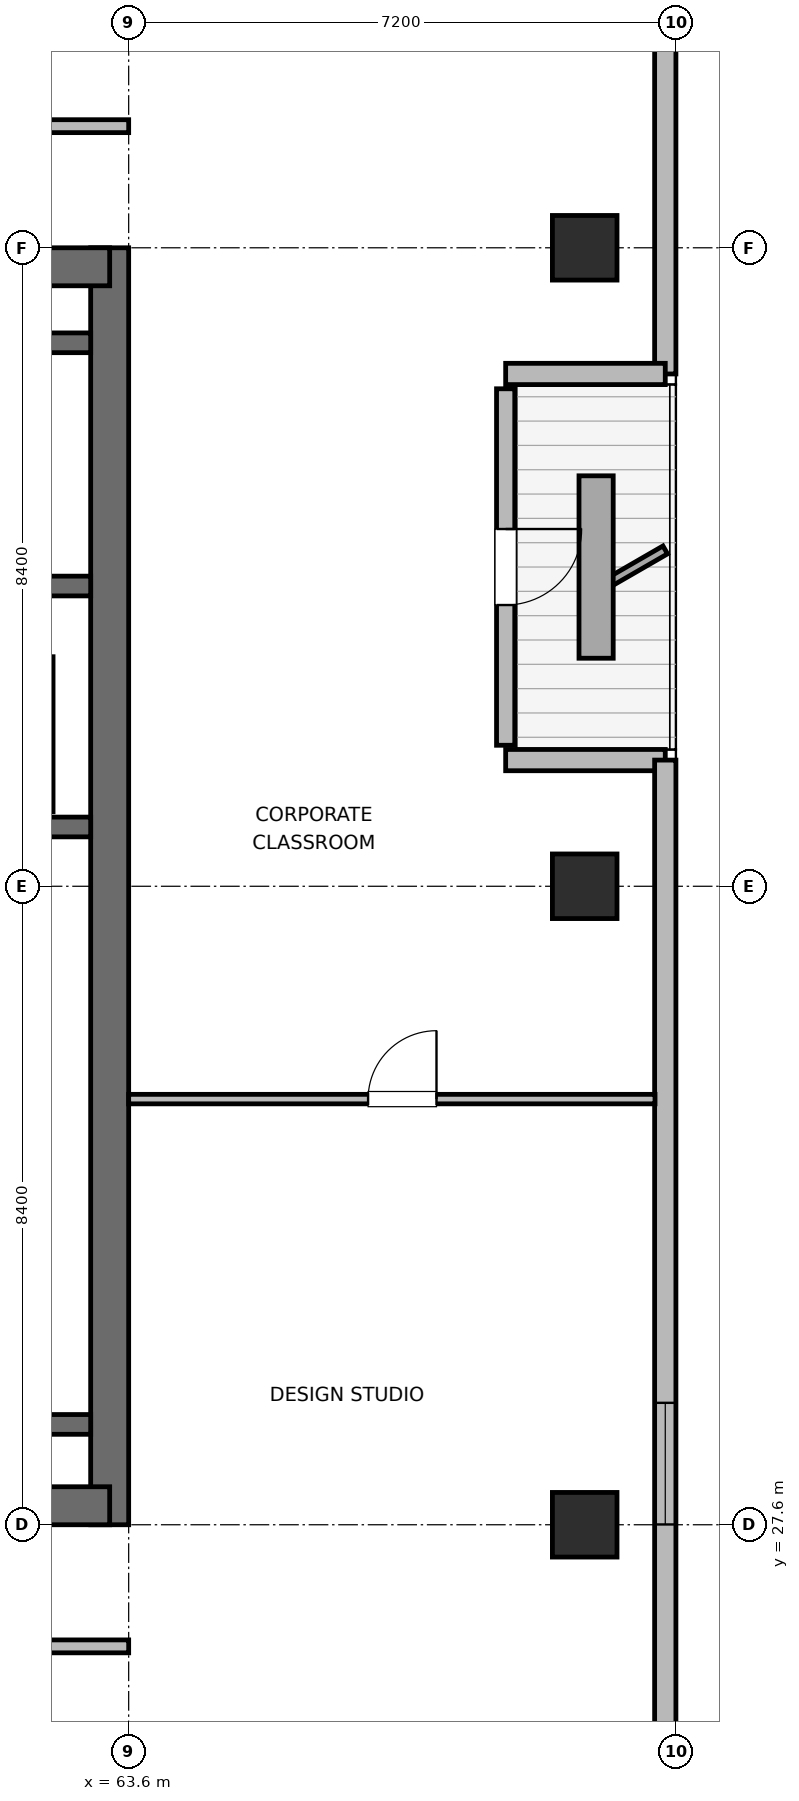
"""IFC4 building model, lengths in metres.
Left out: names, types, materials, properties, quantities, classifications, styles, units other than length and angle.
Written with IfcOpenShell. Run it as: python <this file> out.ifc"""

import sys

from ifc_helpers import new_model, si_unit, direction, frame, frame_2d, origin, origin_2d, place, context, subcontext, project, spatial, rectangle, extrude, element, fill, save


model = new_model("IFC4")
c1 = context("Model", 3, precision=1e-05, world=origin(), true_north=direction((0.0, 1.0)))
c2 = subcontext(c1, "Body", "Model", "MODEL_VIEW")
j1 = project(units=[si_unit("LENGTHUNIT", "METRE"), si_unit("PLANEANGLEUNIT", "RADIAN")], contexts=[c1])
p1 = place(None, origin())
s1 = spatial("IfcSite", under=j1, at=p1, CompositionType="ELEMENT")
p2 = place(p1, origin())
s2 = spatial("IfcBuilding", under=s1, at=p2, CompositionType="ELEMENT")
p3 = place(p2, frame((0.0, 0.0, 302.4)))
s3 = spatial("IfcBuildingStorey", under=s2, at=p3, CompositionType="ELEMENT", Elevation=302.4)
p4 = place(p3, frame((63.35, 27.6, 0.0), z_axis=(0.0, 0.0, 1.0), x_axis=(0.0, 1.0, 0.0)))
e1 = element("IfcWall", 1, at=p4, inside=s3, PredefinedType="SHEAR", context=c2, shape_type="SweptSolid", body=[
    extrude(rectangle(XDim=16.8, YDim=0.5, at=frame_2d((8.4, 0.0))), origin(), (0.0, 0.0, 1.0), 3.9),
])
p5 = place(p3, frame((53.85, 27.85, 0.0), z_axis=(0.0, 0.0, 1.0), x_axis=(1.0, 0.0, 0.0)))
e2 = element("IfcWall", 2, at=p5, inside=s3, PredefinedType="SHEAR", context=c2, shape_type="SweptSolid", body=[
    extrude(rectangle(XDim=9.5, YDim=0.5, at=frame_2d((4.75, 0.0))), origin(), (0.0, 0.0, 1.0), 3.9),
])
p6 = place(p5, frame((4.025, 0.0, 0.0)))
e3 = element("IfcOpeningElement", 3, at=p6, cuts=e2, PredefinedType="OPENING", context=c2, shape_type="SweptSolid", body=[
    extrude(rectangle(XDim=1.05, YDim=2.04, at=frame_2d((0.525, 1.02))), frame((0.0, 0.26, 0.0), z_axis=(0.0, -1.0, 0.0), x_axis=(1.0, 0.0, 0.0)), (0.0, 0.0, 1.0), 0.52),
])
p7 = place(p3, frame((53.85, 44.15, 0.0), z_axis=(0.0, 0.0, 1.0), x_axis=(1.0, 0.0, 0.0)))
e4 = element("IfcWall", 4, at=p7, inside=s3, PredefinedType="SHEAR", context=c2, shape_type="SweptSolid", body=[
    extrude(rectangle(XDim=9.5, YDim=0.5, at=frame_2d((4.75, 0.0))), origin(), (0.0, 0.0, 1.0), 3.9),
])
for number, where, z_axis, x_axis in (
    (5, (58.89, 28.92, 0.0), (0.0, 0.0, 1.0), (1.0, 0.0, 0.0)),
    (6, (58.89, 36.78, 0.0), (0.0, 0.0, 1.0), (1.0, 0.0, 0.0)),
):
    element("IfcWall", number, at=place(p3, frame(where, z_axis=z_axis, x_axis=x_axis)), inside=s3, PredefinedType="SHEAR", context=c2, shape_type="SweptSolid", body=[
        extrude(rectangle(XDim=4.21, YDim=0.26, at=frame_2d((2.105, 0.0))), origin(), (0.0, 0.0, 1.0), 3.9),
    ])
p8 = place(p3, frame((54.1, 39.95, 0.0), z_axis=(0.0, 0.0, 1.0), x_axis=(1.0, 0.0, 0.0)))
e7 = element("IfcWall", 7, at=p8, inside=s3, PredefinedType="SHEAR", context=c2, shape_type="SweptSolid", body=[
    extrude(rectangle(XDim=9.0, YDim=0.26, at=frame_2d((4.5, 0.0))), origin(), (0.0, 0.0, 1.0), 3.9),
])
p9 = place(p8, frame((1.1, 0.0, 0.0)))
e8 = element("IfcOpeningElement", 8, at=p9, cuts=e7, PredefinedType="OPENING", context=c2, shape_type="SweptSolid", body=[
    extrude(rectangle(XDim=1.0, YDim=2.04, at=frame_2d((0.5, 1.02))), frame((0.0, 0.14, 0.0), z_axis=(0.0, -1.0, 0.0), x_axis=(1.0, 0.0, 0.0)), (0.0, 0.0, 1.0), 0.28),
])
p10 = place(p3, frame((54.1, 43.15, 0.0), z_axis=(0.0, 0.0, 1.0), x_axis=(1.0, 0.0, 0.0)))
e9 = element("IfcWall", 9, at=p10, inside=s3, PredefinedType="SHEAR", context=c2, shape_type="SweptSolid", body=[
    extrude(rectangle(XDim=9.0, YDim=0.26, at=frame_2d((4.5, 0.0))), origin(), (0.0, 0.0, 1.0), 3.9),
])
for number, where, z_axis, x_axis in (
    (10, (69.6, 27.6, 0.0), (0.0, 0.0, 1.0), (1.0, 0.0, 0.0)),
    (11, (69.6, 36.0, 0.0), (0.0, 0.0, 1.0), (1.0, 0.0, 0.0)),
    (12, (69.6, 44.4, 0.0), (0.0, 0.0, 1.0), (1.0, 0.0, 0.0)),
):
    element("IfcColumn", number, at=place(p3, frame(where, z_axis=z_axis, x_axis=x_axis)), inside=s3, PredefinedType="COLUMN", context=c2, shape_type="SweptSolid", body=[
        extrude(rectangle(XDim=0.85, YDim=0.85, at=origin_2d()), origin(), (0.0, 0.0, 1.0), 3.9),
    ])
p11 = place(p3, frame((70.66, 48.582, 0.0), z_axis=(0.0, 0.0, 1.0), x_axis=(0.0, -1.0, 0.0)))
e13 = element("IfcWall", 13, at=p11, inside=s3, PredefinedType="SOLIDWALL", context=c2, shape_type="SweptSolid", body=[
    extrude(rectangle(XDim=5.842, YDim=0.28, at=frame_2d((2.921, 0.0))), origin(), (0.0, 0.0, 1.0), 3.68),
])
p12 = place(p3, frame((70.66, 42.74, 0.0), z_axis=(0.0, 0.0, 1.0), x_axis=(-1.0, 0.0, 0.0)))
e14 = element("IfcWall", 14, at=p12, inside=s3, PredefinedType="SOLIDWALL", context=c2, shape_type="SweptSolid", body=[
    extrude(rectangle(XDim=2.1, YDim=0.28, at=frame_2d((1.05, 0.0))), origin(), (0.0, 0.0, 1.0), 3.126),
])
p13 = place(p3, frame((68.56, 42.545, 0.0), z_axis=(0.0, 0.0, 1.0), x_axis=(0.0, -1.0, 0.0)))
e15 = element("IfcWall", 15, at=p13, inside=s3, PredefinedType="SOLIDWALL", context=c2, shape_type="SweptSolid", body=[
    extrude(rectangle(XDim=4.69, YDim=0.24, at=frame_2d((2.345, 0.0))), origin(), (0.0, 0.0, 1.0), 3.311),
])
p14 = place(p13, frame((1.845, 0.0, 0.0)))
e16 = element("IfcOpeningElement", 16, at=p14, cuts=e15, PredefinedType="OPENING", context=c2, shape_type="SweptSolid", body=[
    extrude(rectangle(XDim=1.0, YDim=2.02, at=frame_2d((0.5, 1.01))), frame((0.0, 0.13, 0.0), z_axis=(0.0, -1.0, 0.0), x_axis=(1.0, 0.0, 0.0)), (0.0, 0.0, 1.0), 0.26),
])
p15 = place(p3, frame((68.56, 37.66, 0.0), z_axis=(0.0, 0.0, 1.0), x_axis=(1.0, 0.0, 0.0)))
e17 = element("IfcWall", 17, at=p15, inside=s3, PredefinedType="SOLIDWALL", context=c2, shape_type="SweptSolid", body=[
    extrude(rectangle(XDim=2.1, YDim=0.28, at=frame_2d((1.05, 0.0))), origin(), (0.0, 0.0, 1.0), 3.126),
])
p16 = place(p3, frame((70.66, 37.66, 0.0), z_axis=(0.0, 0.0, 1.0), x_axis=(0.0, -1.0, 0.0)))
e18 = element("IfcWall", 18, at=p16, inside=s3, PredefinedType="SOLIDWALL", context=c2, shape_type="SweptSolid", body=[
    extrude(rectangle(XDim=14.241, YDim=0.28, at=frame_2d((7.121, 0.0))), origin(), (0.0, 0.0, 1.0), 3.68),
])
p17 = place(p16, frame((8.456, 0.0, 0.85)))
e19 = element("IfcOpeningElement", 19, at=p17, cuts=e18, PredefinedType="OPENING", context=c2, shape_type="SweptSolid", body=[
    extrude(rectangle(XDim=1.6, YDim=1.0, at=frame_2d((0.8, 0.5))), frame((0.0, 0.15, 0.0), z_axis=(0.0, -1.0, 0.0), x_axis=(1.0, 0.0, 0.0)), (0.0, 0.0, 1.0), 0.3),
])
p18 = place(p3, frame((62.5, 36.98, 0.0), z_axis=(0.0, 0.0, 1.0), x_axis=(0.0, 1.0, 0.0)))
e20 = element("IfcWall", 20, at=p18, inside=s3, PredefinedType="PARTITIONING", context=c2, shape_type="SweptSolid", body=[
    extrude(rectangle(XDim=2.04, YDim=0.21, at=frame_2d((1.02, 0.0))), origin(), (0.0, 0.0, 1.0), 3.68),
])
p19 = place(p3, frame((30.725, 26.0, 0.0), z_axis=(0.0, 0.0, 1.0), x_axis=(1.0, 0.0, 0.0)))
e21 = element("IfcWall", 21, at=p19, inside=s3, PredefinedType="PARTITIONING", context=c2, shape_type="SweptSolid", body=[
    extrude(rectangle(XDim=32.875, YDim=0.17, at=frame_2d((16.438, 0.0))), origin(), (0.0, 0.0, 1.0), 3.68),
])
p20 = place(p19, frame((1.362, 0.0, 0.0)))
e22 = element("IfcOpeningElement", 22, at=p20, cuts=e21, PredefinedType="OPENING", context=c2, shape_type="SweptSolid", body=[
    extrude(rectangle(XDim=0.95, YDim=2.04, at=frame_2d((0.475, 1.02))), frame((0.0, 0.095, 0.0), z_axis=(0.0, -1.0, 0.0), x_axis=(1.0, 0.0, 0.0)), (0.0, 0.0, 1.0), 0.19),
])
p21 = place(p19, frame((5.0, 0.0, 0.0)))
e23 = element("IfcOpeningElement", 23, at=p21, cuts=e21, PredefinedType="OPENING", context=c2, shape_type="SweptSolid", body=[
    extrude(rectangle(XDim=0.95, YDim=2.04, at=frame_2d((0.475, 1.02))), frame((0.0, 0.095, 0.0), z_axis=(0.0, -1.0, 0.0), x_axis=(1.0, 0.0, 0.0)), (0.0, 0.0, 1.0), 0.19),
])
p22 = place(p19, frame((8.6, 0.0, 0.0)))
e24 = element("IfcOpeningElement", 24, at=p22, cuts=e21, PredefinedType="OPENING", context=c2, shape_type="SweptSolid", body=[
    extrude(rectangle(XDim=0.95, YDim=2.04, at=frame_2d((0.475, 1.02))), frame((0.0, 0.095, 0.0), z_axis=(0.0, -1.0, 0.0), x_axis=(1.0, 0.0, 0.0)), (0.0, 0.0, 1.0), 0.19),
])
p23 = place(p19, frame((13.1, 0.0, 0.0)))
e25 = element("IfcOpeningElement", 25, at=p23, cuts=e21, PredefinedType="OPENING", context=c2, shape_type="SweptSolid", body=[
    extrude(rectangle(XDim=0.95, YDim=2.04, at=frame_2d((0.475, 1.02))), frame((0.0, 0.095, 0.0), z_axis=(0.0, -1.0, 0.0), x_axis=(1.0, 0.0, 0.0)), (0.0, 0.0, 1.0), 0.19),
])
p24 = place(p19, frame((18.0, 0.0, 0.0)))
e26 = element("IfcOpeningElement", 26, at=p24, cuts=e21, PredefinedType="OPENING", context=c2, shape_type="SweptSolid", body=[
    extrude(rectangle(XDim=0.95, YDim=2.04, at=frame_2d((0.475, 1.02))), frame((0.0, 0.095, 0.0), z_axis=(0.0, -1.0, 0.0), x_axis=(1.0, 0.0, 0.0)), (0.0, 0.0, 1.0), 0.19),
])
p25 = place(p19, frame((22.4, 0.0, 0.0)))
e27 = element("IfcOpeningElement", 27, at=p25, cuts=e21, PredefinedType="OPENING", context=c2, shape_type="SweptSolid", body=[
    extrude(rectangle(XDim=0.95, YDim=2.04, at=frame_2d((0.475, 1.02))), frame((0.0, 0.095, 0.0), z_axis=(0.0, -1.0, 0.0), x_axis=(1.0, 0.0, 0.0)), (0.0, 0.0, 1.0), 0.19),
])
p26 = place(p19, frame((26.8, 0.0, 0.0)))
e28 = element("IfcOpeningElement", 28, at=p26, cuts=e21, PredefinedType="OPENING", context=c2, shape_type="SweptSolid", body=[
    extrude(rectangle(XDim=0.95, YDim=2.04, at=frame_2d((0.475, 1.02))), frame((0.0, 0.095, 0.0), z_axis=(0.0, -1.0, 0.0), x_axis=(1.0, 0.0, 0.0)), (0.0, 0.0, 1.0), 0.19),
])
p27 = place(p19, frame((30.7, 0.0, 0.0)))
e29 = element("IfcOpeningElement", 29, at=p27, cuts=e21, PredefinedType="OPENING", context=c2, shape_type="SweptSolid", body=[
    extrude(rectangle(XDim=0.95, YDim=2.04, at=frame_2d((0.475, 1.02))), frame((0.0, 0.095, 0.0), z_axis=(0.0, -1.0, 0.0), x_axis=(1.0, 0.0, 0.0)), (0.0, 0.0, 1.0), 0.19),
])
p28 = place(p3, frame((30.725, 46.0, 0.0), z_axis=(0.0, 0.0, 1.0), x_axis=(1.0, 0.0, 0.0)))
e30 = element("IfcWall", 30, at=p28, inside=s3, PredefinedType="PARTITIONING", context=c2, shape_type="SweptSolid", body=[
    extrude(rectangle(XDim=32.875, YDim=0.17, at=frame_2d((16.438, 0.0))), origin(), (0.0, 0.0, 1.0), 3.68),
])
p29 = place(p28, frame((1.962, 0.0, 0.0)))
e31 = element("IfcOpeningElement", 31, at=p29, cuts=e30, PredefinedType="OPENING", context=c2, shape_type="SweptSolid", body=[
    extrude(rectangle(XDim=0.95, YDim=2.04, at=frame_2d((0.475, 1.02))), frame((0.0, 0.095, 0.0), z_axis=(0.0, -1.0, 0.0), x_axis=(1.0, 0.0, 0.0)), (0.0, 0.0, 1.0), 0.19),
])
p30 = place(p28, frame((6.4, 0.0, 0.0)))
e32 = element("IfcOpeningElement", 32, at=p30, cuts=e30, PredefinedType="OPENING", context=c2, shape_type="SweptSolid", body=[
    extrude(rectangle(XDim=0.95, YDim=2.04, at=frame_2d((0.475, 1.02))), frame((0.0, 0.095, 0.0), z_axis=(0.0, -1.0, 0.0), x_axis=(1.0, 0.0, 0.0)), (0.0, 0.0, 1.0), 0.19),
])
p31 = place(p28, frame((12.0, 0.0, 0.0)))
e33 = element("IfcOpeningElement", 33, at=p31, cuts=e30, PredefinedType="OPENING", context=c2, shape_type="SweptSolid", body=[
    extrude(rectangle(XDim=0.95, YDim=2.04, at=frame_2d((0.475, 1.02))), frame((0.0, 0.095, 0.0), z_axis=(0.0, -1.0, 0.0), x_axis=(1.0, 0.0, 0.0)), (0.0, 0.0, 1.0), 0.19),
])
p32 = place(p28, frame((18.7, 0.0, 0.0)))
e34 = element("IfcOpeningElement", 34, at=p32, cuts=e30, PredefinedType="OPENING", context=c2, shape_type="SweptSolid", body=[
    extrude(rectangle(XDim=0.95, YDim=2.04, at=frame_2d((0.475, 1.02))), frame((0.0, 0.095, 0.0), z_axis=(0.0, -1.0, 0.0), x_axis=(1.0, 0.0, 0.0)), (0.0, 0.0, 1.0), 0.19),
])
p33 = place(p28, frame((23.7, 0.0, 0.0)))
e35 = element("IfcOpeningElement", 35, at=p33, cuts=e30, PredefinedType="OPENING", context=c2, shape_type="SweptSolid", body=[
    extrude(rectangle(XDim=0.95, YDim=2.04, at=frame_2d((0.475, 1.02))), frame((0.0, 0.095, 0.0), z_axis=(0.0, -1.0, 0.0), x_axis=(1.0, 0.0, 0.0)), (0.0, 0.0, 1.0), 0.19),
])
p34 = place(p28, frame((27.4, 0.0, 0.0)))
e36 = element("IfcOpeningElement", 36, at=p34, cuts=e30, PredefinedType="OPENING", context=c2, shape_type="SweptSolid", body=[
    extrude(rectangle(XDim=0.95, YDim=2.04, at=frame_2d((0.475, 1.02))), frame((0.0, 0.095, 0.0), z_axis=(0.0, -1.0, 0.0), x_axis=(1.0, 0.0, 0.0)), (0.0, 0.0, 1.0), 0.19),
])
p35 = place(p28, frame((30.8, 0.0, 0.0)))
e37 = element("IfcOpeningElement", 37, at=p35, cuts=e30, PredefinedType="OPENING", context=c2, shape_type="SweptSolid", body=[
    extrude(rectangle(XDim=0.95, YDim=2.04, at=frame_2d((0.475, 1.02))), frame((0.0, 0.095, 0.0), z_axis=(0.0, -1.0, 0.0), x_axis=(1.0, 0.0, 0.0)), (0.0, 0.0, 1.0), 0.19),
])
p36 = place(p3, frame((63.6, 33.2, 0.0), z_axis=(0.0, 0.0, 1.0), x_axis=(1.0, 0.0, 0.0)))
e38 = element("IfcWall", 38, at=p36, inside=s3, PredefinedType="PARTITIONING", context=c2, shape_type="SweptSolid", body=[
    extrude(rectangle(XDim=6.925, YDim=0.125, at=frame_2d((3.462, 0.0))), origin(), (0.0, 0.0, 1.0), 3.68),
])
p37 = place(p36, frame((3.15, 0.0, 0.0)))
e39 = element("IfcOpeningElement", 39, at=p37, cuts=e38, PredefinedType="OPENING", context=c2, shape_type="SweptSolid", body=[
    extrude(rectangle(XDim=0.9, YDim=2.02, at=frame_2d((0.45, 1.01))), frame((0.0, 0.073, 0.0), z_axis=(0.0, -1.0, 0.0), x_axis=(1.0, 0.0, 0.0)), (0.0, 0.0, 1.0), 0.145),
])
p38 = place(p14, origin())
e40 = element("IfcDoor", 40, at=p38, inside=s3, OperationType="SINGLE_SWING_LEFT", PredefinedType="DOOR", context=c2, shape_type="SweptSolid", body=[
    extrude(rectangle(XDim=1.0, YDim=2.02, at=frame_2d((0.5, 1.01))), frame((0.0, 0.025, 0.0), z_axis=(0.0, -1.0, 0.0), x_axis=(1.0, 0.0, 0.0)), (0.0, 0.0, 1.0), 0.05),
])
fill(e16, e40)
p39 = place(p17, origin())
e41 = element("IfcWindow", 41, at=p39, inside=s3, PartitioningType="SINGLE_PANEL", PredefinedType="WINDOW", context=c2, shape_type="SweptSolid", body=[
    extrude(rectangle(XDim=1.6, YDim=1.0, at=frame_2d((0.8, 0.5))), frame((0.0, 0.03, 0.0), z_axis=(0.0, -1.0, 0.0), x_axis=(1.0, 0.0, 0.0)), (0.0, 0.0, 1.0), 0.06),
])
fill(e19, e41)
p40 = place(p37, origin())
e42 = element("IfcDoor", 42, at=p40, inside=s3, OperationType="SINGLE_SWING_RIGHT", PredefinedType="DOOR", context=c2, shape_type="SweptSolid", body=[
    extrude(rectangle(XDim=0.9, YDim=2.02, at=frame_2d((0.45, 1.01))), frame((0.0, 0.025, 0.0), z_axis=(0.0, -1.0, 0.0), x_axis=(1.0, 0.0, 0.0)), (0.0, 0.0, 1.0), 0.05),
])
fill(e39, e42)
save(model, sys.argv[1])
